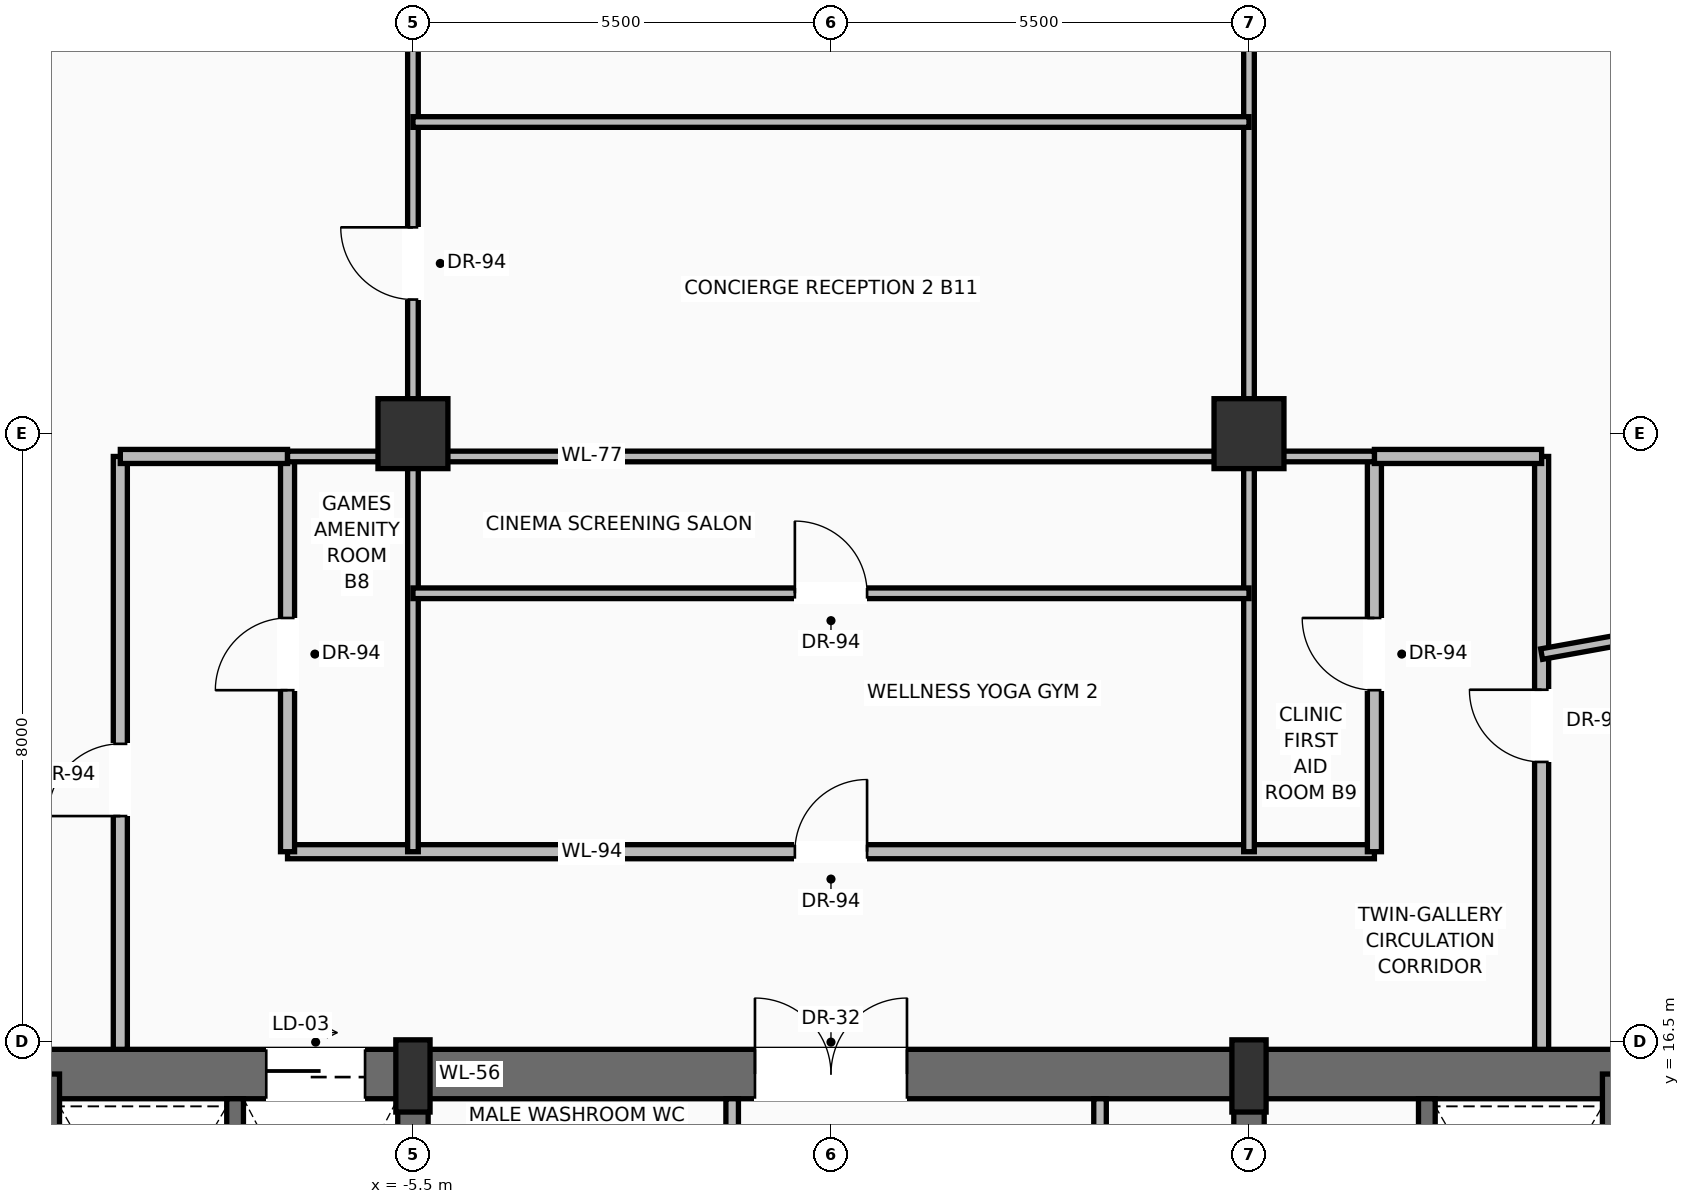
"""IFC4 building model, lengths in metres.
Left out: names, types, materials, properties, quantities, classifications, styles, units other than length and angle.
Written with IfcOpenShell. Run it as: python <this file> out.ifc"""

import sys

from ifc_helpers import new_model, si_unit, direction, frame, frame_2d, origin, origin_2d, place, context, subcontext, project, spatial, rectangle, extrude, source, transform, mapped, element, fill, save


model = new_model("IFC4")
c1 = context("Model", 3, precision=1e-05, world=origin(), true_north=direction((0.0, 1.0)))
c2 = subcontext(c1, "Body", "Model", "MODEL_VIEW")
j1 = project(units=[si_unit("LENGTHUNIT", "METRE"), si_unit("PLANEANGLEUNIT", "RADIAN")], contexts=[c1])
p1 = place(None, origin())
s1 = spatial("IfcSite", under=j1, at=p1, CompositionType="ELEMENT")
p2 = place(p1, origin())
s2 = spatial("IfcBuilding", under=s1, at=p2, CompositionType="ELEMENT")
p3 = place(p2, frame((0.0, 0.0, 158.9)))
s3 = spatial("IfcBuildingStorey", under=s2, at=p3, CompositionType="ELEMENT", Elevation=158.9)
p4 = place(p3, frame((-10.8, 16.075, 0.0), z_axis=(0.0, 0.0, 1.0), x_axis=(1.0, 0.0, 0.0)))
e1 = element("IfcWall", 1, at=p4, inside=s3, PredefinedType="SHEAR", context=c2, shape_type="SweptSolid", body=[
    extrude(rectangle(XDim=21.6, YDim=0.65, at=frame_2d((10.8, 0.0))), origin(), (0.0, 0.0, 1.0), 3.47),
])
p5 = place(p4, frame((3.37, 0.0, 0.0)))
e2 = element("IfcOpeningElement", 2, at=p5, cuts=e1, PredefinedType="OPENING", context=c2, shape_type="SweptSolid", body=[
    extrude(rectangle(XDim=1.3, YDim=2.3, at=frame_2d((0.65, 1.15))), frame((0.0, 0.335, 0.0), z_axis=(0.0, -1.0, 0.0), x_axis=(1.0, 0.0, 0.0)), (0.0, 0.0, 1.0), 0.67),
])
p6 = place(p4, frame((9.8, 0.0, 0.0)))
e3 = element("IfcOpeningElement", 3, at=p6, cuts=e1, PredefinedType="OPENING", context=c2, shape_type="SweptSolid", body=[
    extrude(rectangle(XDim=2.0, YDim=2.4, at=frame_2d((1.0, 1.2))), frame((0.0, 0.335, 0.0), z_axis=(0.0, -1.0, 0.0), x_axis=(1.0, 0.0, 0.0)), (0.0, 0.0, 1.0), 0.67),
])
for number, where, z_axis, x_axis in (
    (4, (-10.475, 0.525, 0.0), (0.0, 0.0, 1.0), (0.0, 1.0, 0.0)),
    (5, (10.475, 0.525, 0.0), (0.0, 0.0, 1.0), (0.0, 1.0, 0.0)),
):
    element("IfcWall", number, at=place(p3, frame(where, z_axis=z_axis, x_axis=x_axis)), inside=s3, PredefinedType="SHEAR", context=c2, shape_type="SweptSolid", body=[
        extrude(rectangle(XDim=15.55, YDim=0.65, at=frame_2d((7.775, 0.0))), origin(), (0.0, 0.0, 1.0), 3.47),
    ])
p7 = place(p3, frame((-5.5, 0.525, 0.0), z_axis=(0.0, 0.0, 1.0), x_axis=(0.0, 1.0, 0.0)))
e6 = element("IfcWall", 6, at=p7, inside=s3, PredefinedType="SHEAR", context=c2, shape_type="SweptSolid", body=[
    extrude(rectangle(XDim=15.55, YDim=0.4, at=frame_2d((7.775, 0.0))), origin(), (0.0, 0.0, 1.0), 3.47),
])
p8 = place(p7, frame((8.975, 0.0, 0.0)))
e7 = element("IfcOpeningElement", 7, at=p8, cuts=e6, PredefinedType="OPENING", context=c2, shape_type="SweptSolid", body=[
    extrude(rectangle(XDim=1.1, YDim=2.2, at=frame_2d((0.55, 1.1))), frame((0.0, 0.21, 0.0), z_axis=(0.0, -1.0, 0.0), x_axis=(1.0, 0.0, 0.0)), (0.0, 0.0, 1.0), 0.42),
])
p9 = place(p3, frame((5.5, 0.525, 0.0), z_axis=(0.0, 0.0, 1.0), x_axis=(0.0, 1.0, 0.0)))
e8 = element("IfcWall", 8, at=p9, inside=s3, PredefinedType="SHEAR", context=c2, shape_type="SweptSolid", body=[
    extrude(rectangle(XDim=15.55, YDim=0.4, at=frame_2d((7.775, 0.0))), origin(), (0.0, 0.0, 1.0), 3.47),
])
p10 = place(p9, frame((8.975, 0.0, 0.0)))
e9 = element("IfcOpeningElement", 9, at=p10, cuts=e8, PredefinedType="OPENING", context=c2, shape_type="SweptSolid", body=[
    extrude(rectangle(XDim=1.1, YDim=2.2, at=frame_2d((0.55, 1.1))), frame((0.0, 0.21, 0.0), z_axis=(0.0, -1.0, 0.0), x_axis=(1.0, 0.0, 0.0)), (0.0, 0.0, 1.0), 0.42),
])
m1 = source(origin(), c2, "Body", "SweptSolid", [
    extrude(rectangle(XDim=0.45, YDim=0.95, at=origin_2d()), origin(), (0.0, 0.0, 1.0), 3.7),
])
for number, where, z_axis, x_axis in (
    (10, (-5.5, 16.05, 0.0), (0.0, 0.0, 1.0), (1.0, 0.0, 0.0)),
    (11, (5.5, 16.05, 0.0), (0.0, 0.0, 1.0), (1.0, 0.0, 0.0)),
):
    element("IfcColumn", number, at=place(p3, frame(where, z_axis=z_axis, x_axis=x_axis)), inside=s3, PredefinedType="PILASTER", context=c2, shape_type="MappedRepresentation", body=[
        mapped(m1, transform((0.0, 0.0, 0.0), scale=1.0)),
    ])
m2 = source(origin(), c2, "Body", "SweptSolid", [
    extrude(rectangle(XDim=0.92, YDim=0.92, at=origin_2d()), origin(), (0.0, 0.0, 1.0), 3.7),
])
for number, where, z_axis, x_axis in (
    (12, (-5.5, 24.5, 0.0), (0.0, 0.0, 1.0), (1.0, 0.0, 0.0)),
    (13, (5.5, 24.5, 0.0), (0.0, 0.0, 1.0), (1.0, 0.0, 0.0)),
):
    element("IfcColumn", number, at=place(p3, frame(where, z_axis=z_axis, x_axis=x_axis)), inside=s3, PredefinedType="COLUMN", context=c2, shape_type="MappedRepresentation", body=[
        mapped(m2, transform((0.0, 0.0, 0.0), scale=1.0)),
    ])
for number, where, z_axis, x_axis in (
    (14, (-7.84, 11.87, 0.0), (0.0, 0.0, 1.0), (0.0, 1.0, 0.0)),
    (15, (7.84, 11.87, 0.0), (0.0, 0.0, 1.0), (0.0, 1.0, 0.0)),
):
    element("IfcWall", number, at=place(p3, frame(where, z_axis=z_axis, x_axis=x_axis)), inside=s3, PredefinedType="SOLIDWALL", context=c2, shape_type="SweptSolid", body=[
        extrude(rectangle(XDim=3.88, YDim=0.22, at=frame_2d((1.94, 0.0))), origin(), (0.0, 0.0, 1.0), 3.47),
    ])
p11 = place(p3, frame((-1.3, 13.6, 0.0), z_axis=(0.0, 0.0, 1.0), x_axis=(0.0, 1.0, 0.0)))
e16 = element("IfcWall", 16, at=p11, inside=s3, PredefinedType="PARTITIONING", context=c2, shape_type="SweptSolid", body=[
    extrude(rectangle(XDim=2.15, YDim=0.165, at=frame_2d((1.075, 0.0))), origin(), (0.0, 0.0, 1.0), 3.462),
])
p12 = place(p11, frame((0.55, 0.0, 0.0)))
e17 = element("IfcOpeningElement", 17, at=p12, cuts=e16, PredefinedType="OPENING", context=c2, shape_type="SweptSolid", body=[
    extrude(rectangle(XDim=0.9, YDim=2.1, at=frame_2d((0.45, 1.05))), frame((0.0, 0.093, 0.0), z_axis=(0.0, -1.0, 0.0), x_axis=(1.0, 0.0, 0.0)), (0.0, 0.0, 1.0), 0.185),
])
p13 = place(p3, frame((3.54, 11.22, 0.0), z_axis=(0.0, 0.0, 1.0), x_axis=(0.0, 1.0, 0.0)))
e18 = element("IfcWall", 18, at=p13, inside=s3, PredefinedType="PARTITIONING", context=c2, shape_type="SweptSolid", body=[
    extrude(rectangle(XDim=4.53, YDim=0.165, at=frame_2d((2.265, 0.0))), origin(), (0.0, 0.0, 1.0), 3.462),
])
p14 = place(p13, frame((1.25, 0.0, 0.0)))
e19 = element("IfcOpeningElement", 19, at=p14, cuts=e18, PredefinedType="OPENING", context=c2, shape_type="SweptSolid", body=[
    extrude(rectangle(XDim=0.9, YDim=2.1, at=frame_2d((0.45, 1.05))), frame((0.0, 0.093, 0.0), z_axis=(0.0, -1.0, 0.0), x_axis=(1.0, 0.0, 0.0)), (0.0, 0.0, 1.0), 0.185),
])
p15 = place(p3, frame((-7.15, 19.0, 0.0), z_axis=(0.0, 0.0, 1.0), x_axis=(1.0, 0.0, 0.0)))
e20 = element("IfcWall", 20, at=p15, inside=s3, PredefinedType="PARTITIONING", context=c2, shape_type="SweptSolid", body=[
    extrude(rectangle(XDim=14.3, YDim=0.185, at=frame_2d((7.15, 0.0))), origin(), (0.0, 0.0, 1.0), 2.846),
])
p16 = place(p15, frame((6.675, 0.0, 0.0)))
e21 = element("IfcOpeningElement", 21, at=p16, cuts=e20, PredefinedType="OPENING", context=c2, shape_type="SweptSolid", body=[
    extrude(rectangle(XDim=0.95, YDim=2.2, at=frame_2d((0.475, 1.1))), frame((0.0, 0.103, 0.0), z_axis=(0.0, -1.0, 0.0), x_axis=(1.0, 0.0, 0.0)), (0.0, 0.0, 1.0), 0.205),
])
p17 = place(p3, frame((-7.15, 19.0, 0.0), z_axis=(0.0, 0.0, 1.0), x_axis=(0.0, 1.0, 0.0)))
e22 = element("IfcWall", 22, at=p17, inside=s3, PredefinedType="PARTITIONING", context=c2, shape_type="SweptSolid", body=[
    extrude(rectangle(XDim=5.2, YDim=0.185, at=frame_2d((2.6, 0.0))), origin(), (0.0, 0.0, 1.0), 3.462),
])
p18 = place(p17, frame((2.125, 0.0, 0.0)))
e23 = element("IfcOpeningElement", 23, at=p18, cuts=e22, PredefinedType="OPENING", context=c2, shape_type="SweptSolid", body=[
    extrude(rectangle(XDim=0.95, YDim=2.2, at=frame_2d((0.475, 1.1))), frame((0.0, 0.103, 0.0), z_axis=(0.0, -1.0, 0.0), x_axis=(1.0, 0.0, 0.0)), (0.0, 0.0, 1.0), 0.205),
])
p19 = place(p3, frame((7.15, 19.0, 0.0), z_axis=(0.0, 0.0, 1.0), x_axis=(0.0, 1.0, 0.0)))
e24 = element("IfcWall", 24, at=p19, inside=s3, PredefinedType="PARTITIONING", context=c2, shape_type="SweptSolid", body=[
    extrude(rectangle(XDim=5.2, YDim=0.185, at=frame_2d((2.6, 0.0))), origin(), (0.0, 0.0, 1.0), 3.462),
])
p20 = place(p19, frame((2.125, 0.0, 0.0)))
e25 = element("IfcOpeningElement", 25, at=p20, cuts=e24, PredefinedType="OPENING", context=c2, shape_type="SweptSolid", body=[
    extrude(rectangle(XDim=0.95, YDim=2.2, at=frame_2d((0.475, 1.1))), frame((0.0, 0.103, 0.0), z_axis=(0.0, -1.0, 0.0), x_axis=(1.0, 0.0, 0.0)), (0.0, 0.0, 1.0), 0.205),
])
p21 = place(p3, frame((-9.35, 16.4, 0.0), z_axis=(0.0, 0.0, 1.0), x_axis=(0.0, 1.0, 0.0)))
e26 = element("IfcWall", 26, at=p21, inside=s3, PredefinedType="PARTITIONING", context=c2, shape_type="SweptSolid", body=[
    extrude(rectangle(XDim=7.8, YDim=0.185, at=frame_2d((3.9, 0.0))), origin(), (0.0, 0.0, 1.0), 3.462),
])
p22 = place(p21, frame((3.069, 0.0, 0.0)))
e27 = element("IfcOpeningElement", 27, at=p22, cuts=e26, PredefinedType="OPENING", context=c2, shape_type="SweptSolid", body=[
    extrude(rectangle(XDim=0.95, YDim=2.2, at=frame_2d((0.475, 1.1))), frame((0.0, 0.103, 0.0), z_axis=(0.0, -1.0, 0.0), x_axis=(1.0, 0.0, 0.0)), (0.0, 0.0, 1.0), 0.205),
])
p23 = place(p3, frame((9.35, 16.4, 0.0), z_axis=(0.0, 0.0, 1.0), x_axis=(0.0, 1.0, 0.0)))
e28 = element("IfcWall", 28, at=p23, inside=s3, PredefinedType="PARTITIONING", context=c2, shape_type="SweptSolid", body=[
    extrude(rectangle(XDim=7.8, YDim=0.185, at=frame_2d((3.9, 0.0))), origin(), (0.0, 0.0, 1.0), 3.462),
])
p24 = place(p23, frame((3.781, 0.0, 0.0)))
e29 = element("IfcOpeningElement", 29, at=p24, cuts=e28, PredefinedType="OPENING", context=c2, shape_type="SweptSolid", body=[
    extrude(rectangle(XDim=0.95, YDim=2.2, at=frame_2d((0.475, 1.1))), frame((0.0, 0.103, 0.0), z_axis=(0.0, -1.0, 0.0), x_axis=(1.0, 0.0, 0.0)), (0.0, 0.0, 1.0), 0.205),
])
for number, where, z_axis, x_axis in (
    (30, (-9.35, 24.2, 0.0), (0.0, 0.0, 1.0), (1.0, 0.0, 0.0)),
    (31, (7.15, 24.2, 0.0), (0.0, 0.0, 1.0), (1.0, 0.0, 0.0)),
):
    element("IfcWall", number, at=place(p3, frame(where, z_axis=z_axis, x_axis=x_axis)), inside=s3, PredefinedType="PARTITIONING", context=c2, shape_type="SweptSolid", body=[
        extrude(rectangle(XDim=2.2, YDim=0.185, at=frame_2d((1.1, 0.0))), origin(), (0.0, 0.0, 1.0), 3.462),
    ])
p25 = place(p3, frame((-7.15, 24.2, 0.0), z_axis=(0.0, 0.0, 1.0), x_axis=(1.0, 0.0, 0.0)))
e32 = element("IfcWall", 32, at=p25, inside=s3, PredefinedType="PARTITIONING", context=c2, shape_type="SweptSolid", body=[
    extrude(rectangle(XDim=14.3, YDim=0.14, at=frame_2d((7.15, 0.0))), origin(), (0.0, 0.0, 1.0), 3.462),
])
p26 = place(p3, frame((-5.5, 19.0, 0.0), z_axis=(0.0, 0.0, 1.0), x_axis=(0.0, 1.0, 0.0)))
e33 = element("IfcWall", 33, at=p26, inside=s3, PredefinedType="PARTITIONING", context=c2, shape_type="SweptSolid", body=[
    extrude(rectangle(XDim=13.5, YDim=0.14, at=frame_2d((6.75, 0.0))), origin(), (0.0, 0.0, 1.0), 2.846),
])
p27 = place(p26, frame((7.264, 0.0, 0.0)))
e34 = element("IfcOpeningElement", 34, at=p27, cuts=e33, PredefinedType="OPENING", context=c2, shape_type="SweptSolid", body=[
    extrude(rectangle(XDim=0.95, YDim=2.2, at=frame_2d((0.475, 1.1))), frame((0.0, 0.08, 0.0), z_axis=(0.0, -1.0, 0.0), x_axis=(1.0, 0.0, 0.0)), (0.0, 0.0, 1.0), 0.16),
])
p28 = place(p3, frame((5.5, 19.0, 0.0), z_axis=(0.0, 0.0, 1.0), x_axis=(0.0, 1.0, 0.0)))
e35 = element("IfcWall", 35, at=p28, inside=s3, PredefinedType="PARTITIONING", context=c2, shape_type="SweptSolid", body=[
    extrude(rectangle(XDim=13.5, YDim=0.14, at=frame_2d((6.75, 0.0))), origin(), (0.0, 0.0, 1.0), 2.846),
])
p29 = place(p3, frame((-5.5, 22.4, 0.0), z_axis=(0.0, 0.0, 1.0), x_axis=(1.0, 0.0, 0.0)))
e36 = element("IfcWall", 36, at=p29, inside=s3, PredefinedType="PARTITIONING", context=c2, shape_type="SweptSolid", body=[
    extrude(rectangle(XDim=11.0, YDim=0.14, at=frame_2d((5.5, 0.0))), origin(), (0.0, 0.0, 1.0), 3.462),
])
p30 = place(p29, frame((5.025, 0.0, 0.0)))
e37 = element("IfcOpeningElement", 37, at=p30, cuts=e36, PredefinedType="OPENING", context=c2, shape_type="SweptSolid", body=[
    extrude(rectangle(XDim=0.95, YDim=2.2, at=frame_2d((0.475, 1.1))), frame((0.0, 0.08, 0.0), z_axis=(0.0, -1.0, 0.0), x_axis=(1.0, 0.0, 0.0)), (0.0, 0.0, 1.0), 0.16),
])
p31 = place(p3, frame((-5.5, 28.6, 0.0), z_axis=(0.0, 0.0, 1.0), x_axis=(1.0, 0.0, 0.0)))
e38 = element("IfcWall", 38, at=p31, inside=s3, PredefinedType="PARTITIONING", context=c2, shape_type="SweptSolid", body=[
    extrude(rectangle(XDim=11.0, YDim=0.14, at=frame_2d((5.5, 0.0))), origin(), (0.0, 0.0, 1.0), 3.462),
])
p32 = place(p3, frame((9.35, 21.6, 0.0), z_axis=(0.0, 0.0, 1.0), x_axis=(0.984141901037, 0.177382971628, 0.0)))
e39 = element("IfcWall", 39, at=p32, inside=s3, PredefinedType="PARTITIONING", context=c2, shape_type="SweptSolid", body=[
    extrude(rectangle(XDim=7.794, YDim=0.14, at=frame_2d((3.897, 0.0))), origin(), (0.0, 0.0, 1.0), 3.049),
])
m3 = source(origin(), c2, "Body", "SweptSolid", [
    extrude(rectangle(XDim=1.3, YDim=2.3, at=frame_2d((0.65, 1.15))), frame((0.0, 0.025, 0.0), z_axis=(0.0, -1.0, 0.0), x_axis=(1.0, 0.0, 0.0)), (0.0, 0.0, 1.0), 0.05),
])
p33 = place(p5, origin())
e40 = element("IfcDoor", 40, at=p33, inside=s3, OperationType="SLIDING_TO_RIGHT", PredefinedType="DOOR", context=c2, shape_type="MappedRepresentation", body=[
    mapped(m3, transform((0.0, 0.0, 0.0), scale=1.0)),
])
fill(e2, e40)
m4 = source(origin(), c2, "Body", "SweptSolid", [
    extrude(rectangle(XDim=2.0, YDim=2.4, at=frame_2d((1.0, 1.2))), frame((0.0, 0.025, 0.0), z_axis=(0.0, -1.0, 0.0), x_axis=(1.0, 0.0, 0.0)), (0.0, 0.0, 1.0), 0.05),
])
p34 = place(p6, origin())
e41 = element("IfcDoor", 41, at=p34, inside=s3, OperationType="DOUBLE_DOOR_SINGLE_SWING", PredefinedType="DOOR", context=c2, shape_type="MappedRepresentation", body=[
    mapped(m4, transform((0.0, 0.0, 0.0), scale=1.0)),
])
fill(e3, e41)
m5 = source(origin(), c2, "Body", "SweptSolid", [
    extrude(rectangle(XDim=0.95, YDim=2.2, at=frame_2d((0.475, 1.1))), frame((0.0, 0.025, 0.0), z_axis=(0.0, -1.0, 0.0), x_axis=(1.0, 0.0, 0.0)), (0.0, 0.0, 1.0), 0.05),
])
p35 = place(p16, origin())
e42 = element("IfcDoor", 42, at=p35, inside=s3, OperationType="SINGLE_SWING_RIGHT", PredefinedType="DOOR", context=c2, shape_type="MappedRepresentation", body=[
    mapped(m5, transform((0.0, 0.0, 0.0), scale=1.0)),
])
fill(e21, e42)
p36 = place(p22, origin())
e43 = element("IfcDoor", 43, at=p36, inside=s3, OperationType="SINGLE_SWING_LEFT", PredefinedType="DOOR", context=c2, shape_type="MappedRepresentation", body=[
    mapped(m5, transform((0.0, 0.0, 0.0), scale=1.0)),
])
fill(e27, e43)
p37 = place(p24, origin())
e44 = element("IfcDoor", 44, at=p37, inside=s3, OperationType="SINGLE_SWING_RIGHT", PredefinedType="DOOR", context=c2, shape_type="MappedRepresentation", body=[
    mapped(m5, transform((0.0, 0.0, 0.0), scale=1.0)),
])
fill(e29, e44)
p38 = place(p18, origin())
e45 = element("IfcDoor", 45, at=p38, inside=s3, OperationType="SINGLE_SWING_LEFT", PredefinedType="DOOR", context=c2, shape_type="MappedRepresentation", body=[
    mapped(m5, transform((0.0, 0.0, 0.0), scale=1.0)),
])
fill(e23, e45)
p39 = place(p20, origin())
e46 = element("IfcDoor", 46, at=p39, inside=s3, OperationType="SINGLE_SWING_RIGHT", PredefinedType="DOOR", context=c2, shape_type="MappedRepresentation", body=[
    mapped(m5, transform((0.0, 0.0, 0.0), scale=1.0)),
])
fill(e25, e46)
p40 = place(p30, origin())
e47 = element("IfcDoor", 47, at=p40, inside=s3, OperationType="SINGLE_SWING_LEFT", PredefinedType="DOOR", context=c2, shape_type="MappedRepresentation", body=[
    mapped(m5, transform((0.0, 0.0, 0.0), scale=1.0)),
])
fill(e37, e47)
p41 = place(p27, origin())
e48 = element("IfcDoor", 48, at=p41, inside=s3, OperationType="SINGLE_SWING_RIGHT", PredefinedType="DOOR", context=c2, shape_type="MappedRepresentation", body=[
    mapped(m5, transform((0.0, 0.0, 0.0), scale=1.0)),
])
fill(e34, e48)
save(model, sys.argv[1])
